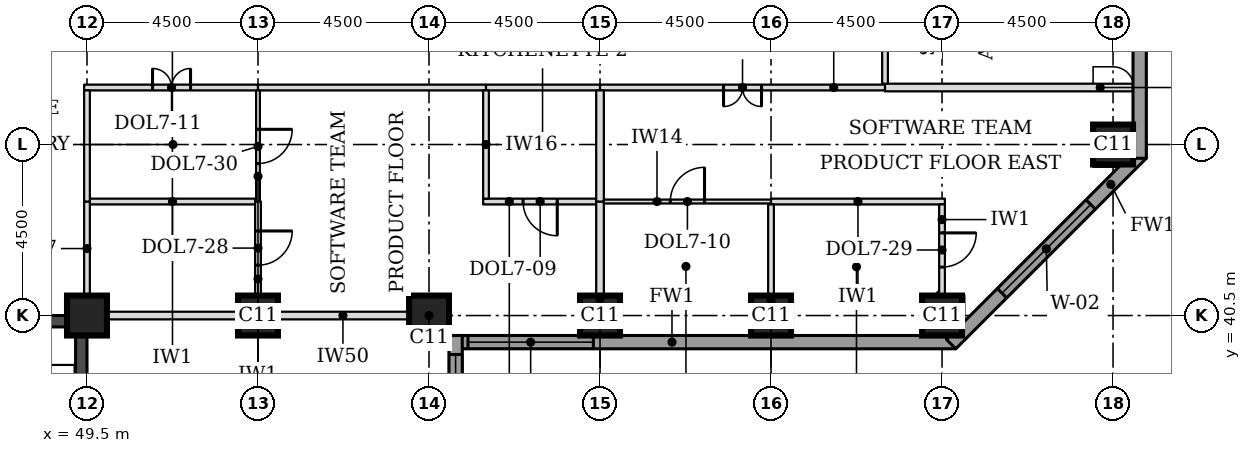
"""IFC4 building model, lengths in metres.
Left out: names, types, materials, properties, quantities, classifications, styles, units other than length and angle.
Written with IfcOpenShell. Run it as: python <this file> out.ifc"""

import sys

from ifc_helpers import new_model, si_unit, direction, frame, frame_2d, origin, origin_2d, place, context, subcontext, project, spatial, rectangle, extrude, element, fill, save


model = new_model("IFC4")
c1 = context("Model", 3, precision=1e-05, world=origin(), true_north=direction((0.0, 1.0)))
c2 = subcontext(c1, "Body", "Model", "MODEL_VIEW")
j1 = project(units=[si_unit("LENGTHUNIT", "METRE"), si_unit("PLANEANGLEUNIT", "RADIAN")], contexts=[c1])
p1 = place(None, origin())
s1 = spatial("IfcSite", under=j1, at=p1, CompositionType="ELEMENT")
p2 = place(p1, origin())
s2 = spatial("IfcBuilding", under=s1, at=p2, CompositionType="ELEMENT")
p3 = place(p2, frame((0.0, 0.0, 134.4)))
s3 = spatial("IfcBuildingStorey", under=s2, at=p3, CompositionType="ELEMENT", Elevation=134.4)
for number, where, z_axis, x_axis in (
    (1, (49.5, 40.5, 0.0), (0.0, 0.0, 1.0), (1.0, 0.0, 0.0)),
    (2, (54.0, 40.5, 0.0), (0.0, 0.0, 1.0), (1.0, 0.0, 0.0)),
    (3, (58.5, 40.5, 0.0), (0.0, 0.0, 1.0), (1.0, 0.0, 0.0)),
    (4, (63.0, 40.5, 0.0), (0.0, 0.0, 1.0), (1.0, 0.0, 0.0)),
    (5, (67.5, 40.5, 0.0), (0.0, 0.0, 1.0), (1.0, 0.0, 0.0)),
    (6, (72.0, 40.5, 0.0), (0.0, 0.0, 1.0), (1.0, 0.0, 0.0)),
    (7, (76.5, 45.0, 0.0), (0.0, 0.0, 1.0), (1.0, 0.0, 0.0)),
):
    element("IfcColumn", number, at=place(p3, frame(where, z_axis=z_axis, x_axis=x_axis)), inside=s3, PredefinedType="COLUMN", context=c2, shape_type="SweptSolid", body=[
        extrude(rectangle(XDim=1.05, YDim=1.05, at=origin_2d()), origin(), (0.0, 0.0, 1.0), 3.7),
    ])
p4 = place(p3, frame((40.8, 40.35, 0.0), z_axis=(0.0, 0.0, 1.0), x_axis=(1.0, 0.0, 0.0)))
e8 = element("IfcWall", 8, at=p4, inside=s3, PredefinedType="SHEAR", context=c2, shape_type="SweptSolid", body=[
    extrude(rectangle(XDim=8.4, YDim=0.3, at=frame_2d((4.2, 0.0))), origin(), (0.0, 0.0, 1.0), 3.7),
])
p5 = place(p4, frame((6.4, 0.0, 0.0)))
e9 = element("IfcOpeningElement", 9, at=p5, cuts=e8, PredefinedType="OPENING", context=c2, shape_type="SweptSolid", body=[
    extrude(rectangle(XDim=1.1, YDim=2.1, at=frame_2d((0.55, 1.05))), frame((0.0, 0.16, 0.0), z_axis=(0.0, -1.0, 0.0), x_axis=(1.0, 0.0, 0.0)), (0.0, 0.0, 1.0), 0.32),
])
p6 = place(p3, frame((49.35, 31.5, 0.0), z_axis=(0.0, 0.0, 1.0), x_axis=(0.0, 1.0, 0.0)))
e10 = element("IfcWall", 10, at=p6, inside=s3, PredefinedType="SHEAR", context=c2, shape_type="SweptSolid", body=[
    extrude(rectangle(XDim=9.0, YDim=0.3, at=frame_2d((4.5, 0.0))), origin(), (0.0, 0.0, 1.0), 3.7),
])
p7 = place(p3, frame((59.025, 39.8, 0.0), z_axis=(0.0, 0.0, 1.0), x_axis=(1.0, 0.0, 0.0)))
e11 = element("IfcWall", 11, at=p7, inside=s3, PredefinedType="STANDARD", context=c2, shape_type="SweptSolid", body=[
    extrude(rectangle(XDim=13.337, YDim=0.35, at=frame_2d((6.669, 0.0))), origin(), (0.0, 0.0, 1.0), 3.525),
])
p8 = place(p7, frame((0.5, 0.0, 0.9)))
e12 = element("IfcOpeningElement", 12, at=p8, cuts=e11, PredefinedType="OPENING", context=c2, shape_type="SweptSolid", body=[
    extrude(rectangle(XDim=3.3, YDim=1.9, at=frame_2d((1.65, 0.95))), frame((0.0, 0.185, 0.0), z_axis=(0.0, -1.0, 0.0), x_axis=(1.0, 0.0, 0.0)), (0.0, 0.0, 1.0), 0.37),
])
p9 = place(p3, frame((72.239, 39.749, 0.0), z_axis=(0.0, 0.0, 1.0), x_axis=(0.707106781187, 0.707106781187, 0.0)))
e13 = element("IfcWall", 13, at=p9, inside=s3, PredefinedType="STANDARD", context=c2, shape_type="SweptSolid", body=[
    extrude(rectangle(XDim=7.089, YDim=0.35, at=frame_2d((3.544, 0.0))), origin(), (0.0, 0.0, 1.0), 3.525),
])
p10 = place(p9, frame((1.894, 0.0, 0.9)))
e14 = element("IfcOpeningElement", 14, at=p10, cuts=e13, PredefinedType="OPENING", context=c2, shape_type="SweptSolid", body=[
    extrude(rectangle(XDim=3.3, YDim=1.9, at=frame_2d((1.65, 0.95))), frame((0.0, 0.185, 0.0), z_axis=(0.0, -1.0, 0.0), x_axis=(1.0, 0.0, 0.0)), (0.0, 0.0, 1.0), 0.37),
])
p11 = place(p3, frame((77.2, 44.638, 0.0), z_axis=(0.0, 0.0, 1.0), x_axis=(0.0, 1.0, 0.0)))
e15 = element("IfcWall", 15, at=p11, inside=s3, PredefinedType="STANDARD", context=c2, shape_type="SweptSolid", body=[
    extrude(rectangle(XDim=32.225, YDim=0.35, at=frame_2d((16.112, 0.0))), origin(), (0.0, 0.0, 1.0), 3.525),
])
p12 = place(p11, frame((5.462, 0.0, 0.9)))
e16 = element("IfcOpeningElement", 16, at=p12, cuts=e15, PredefinedType="OPENING", context=c2, shape_type="SweptSolid", body=[
    extrude(rectangle(XDim=3.3, YDim=1.9, at=frame_2d((1.65, 0.95))), frame((0.0, 0.185, 0.0), z_axis=(0.0, -1.0, 0.0), x_axis=(1.0, 0.0, 0.0)), (0.0, 0.0, 1.0), 0.37),
])
p13 = place(p11, frame((9.962, 0.0, 0.9)))
e17 = element("IfcOpeningElement", 17, at=p13, cuts=e15, PredefinedType="OPENING", context=c2, shape_type="SweptSolid", body=[
    extrude(rectangle(XDim=3.3, YDim=1.9, at=frame_2d((1.65, 0.95))), frame((0.0, 0.185, 0.0), z_axis=(0.0, -1.0, 0.0), x_axis=(1.0, 0.0, 0.0)), (0.0, 0.0, 1.0), 0.37),
])
p14 = place(p11, frame((14.462, 0.0, 0.9)))
e18 = element("IfcOpeningElement", 18, at=p14, cuts=e15, PredefinedType="OPENING", context=c2, shape_type="SweptSolid", body=[
    extrude(rectangle(XDim=3.3, YDim=1.9, at=frame_2d((1.65, 0.95))), frame((0.0, 0.185, 0.0), z_axis=(0.0, -1.0, 0.0), x_axis=(1.0, 0.0, 0.0)), (0.0, 0.0, 1.0), 0.37),
])
p15 = place(p11, frame((18.962, 0.0, 0.9)))
e19 = element("IfcOpeningElement", 19, at=p15, cuts=e15, PredefinedType="OPENING", context=c2, shape_type="SweptSolid", body=[
    extrude(rectangle(XDim=3.3, YDim=1.9, at=frame_2d((1.65, 0.95))), frame((0.0, 0.185, 0.0), z_axis=(0.0, -1.0, 0.0), x_axis=(1.0, 0.0, 0.0)), (0.0, 0.0, 1.0), 0.37),
])
p16 = place(p11, frame((23.462, 0.0, 0.9)))
e20 = element("IfcOpeningElement", 20, at=p16, cuts=e15, PredefinedType="OPENING", context=c2, shape_type="SweptSolid", body=[
    extrude(rectangle(XDim=3.3, YDim=1.9, at=frame_2d((1.65, 0.95))), frame((0.0, 0.185, 0.0), z_axis=(0.0, -1.0, 0.0), x_axis=(1.0, 0.0, 0.0)), (0.0, 0.0, 1.0), 0.37),
])
p17 = place(p3, frame((59.2, 22.138, 0.0), z_axis=(0.0, 0.0, 1.0), x_axis=(0.0, 1.0, 0.0)))
e21 = element("IfcWall", 21, at=p17, inside=s3, PredefinedType="STANDARD", context=c2, shape_type="SweptSolid", body=[
    extrude(rectangle(XDim=17.837, YDim=0.35, at=frame_2d((8.919, 0.0))), origin(), (0.0, 0.0, 1.0), 3.525),
])
p18 = place(p17, frame((5.462, 0.0, 0.9)))
e22 = element("IfcOpeningElement", 22, at=p18, cuts=e21, PredefinedType="OPENING", context=c2, shape_type="SweptSolid", body=[
    extrude(rectangle(XDim=3.3, YDim=1.9, at=frame_2d((1.65, 0.95))), frame((0.0, 0.185, 0.0), z_axis=(0.0, -1.0, 0.0), x_axis=(1.0, 0.0, 0.0)), (0.0, 0.0, 1.0), 0.37),
])
p19 = place(p17, frame((14.037, 0.0, 0.9)))
e23 = element("IfcOpeningElement", 23, at=p19, cuts=e21, PredefinedType="OPENING", context=c2, shape_type="SweptSolid", body=[
    extrude(rectangle(XDim=3.3, YDim=1.9, at=frame_2d((1.65, 0.95))), frame((0.0, 0.185, 0.0), z_axis=(0.0, -1.0, 0.0), x_axis=(1.0, 0.0, 0.0)), (0.0, 0.0, 1.0), 0.37),
])
p20 = place(p3, frame((50.015, 40.5, 0.0), z_axis=(0.0, 0.0, 1.0), x_axis=(1.0, 0.0, 0.0)))
e24 = element("IfcWall", 24, at=p20, inside=s3, PredefinedType="PARTITIONING", context=c2, shape_type="SweptSolid", body=[
    extrude(rectangle(XDim=3.46, YDim=0.2, at=frame_2d((1.73, 0.0))), origin(), (0.0, 0.0, 1.0), 2.8),
])
p21 = place(p3, frame((54.495, 40.5, 0.0), z_axis=(0.0, 0.0, 1.0), x_axis=(1.0, 0.0, 0.0)))
e25 = element("IfcWall", 25, at=p21, inside=s3, PredefinedType="PARTITIONING", context=c2, shape_type="SweptSolid", body=[
    extrude(rectangle(XDim=3.48, YDim=0.2, at=frame_2d((1.74, 0.0))), origin(), (0.0, 0.0, 1.0), 2.8),
])
p22 = place(p3, frame((49.575, 43.5, 0.0), z_axis=(0.0, 0.0, 1.0), x_axis=(1.0, 0.0, 0.0)))
e26 = element("IfcWall", 26, at=p22, inside=s3, PredefinedType="PARTITIONING", context=c2, shape_type="SweptSolid", body=[
    extrude(rectangle(XDim=4.35, YDim=0.15, at=frame_2d((2.175, 0.0))), origin(), (0.0, 0.0, 1.0), 3.55),
])
p23 = place(p3, frame((59.925, 43.5, 0.0), z_axis=(0.0, 0.0, 1.0), x_axis=(1.0, 0.0, 0.0)))
e27 = element("IfcWall", 27, at=p23, inside=s3, PredefinedType="PARTITIONING", context=c2, shape_type="SweptSolid", body=[
    extrude(rectangle(XDim=2.975, YDim=0.15, at=frame_2d((1.487, 0.0))), origin(), (0.0, 0.0, 1.0), 3.55),
])
p24 = place(p23, frame((1.05, 0.0, 0.0)))
e28 = element("IfcOpeningElement", 28, at=p24, cuts=e27, PredefinedType="OPENING", context=c2, shape_type="SweptSolid", body=[
    extrude(rectangle(XDim=0.9, YDim=2.1, at=frame_2d((0.45, 1.05))), frame((0.0, 0.085, 0.0), z_axis=(0.0, -1.0, 0.0), x_axis=(1.0, 0.0, 0.0)), (0.0, 0.0, 1.0), 0.17),
])
p25 = place(p3, frame((63.1, 43.5, 0.0), z_axis=(0.0, 0.0, 1.0), x_axis=(1.0, 0.0, 0.0)))
e29 = element("IfcWall", 29, at=p25, inside=s3, PredefinedType="PARTITIONING", context=c2, shape_type="SweptSolid", body=[
    extrude(rectangle(XDim=4.4, YDim=0.1, at=frame_2d((2.2, 0.0))), origin(), (0.0, 0.0, 1.0), 3.55),
])
p26 = place(p25, frame((1.75, 0.0, 0.0)))
e30 = element("IfcOpeningElement", 30, at=p26, cuts=e29, PredefinedType="OPENING", context=c2, shape_type="SweptSolid", body=[
    extrude(rectangle(XDim=0.9, YDim=2.1, at=frame_2d((0.45, 1.05))), frame((0.0, 0.06, 0.0), z_axis=(0.0, -1.0, 0.0), x_axis=(1.0, 0.0, 0.0)), (0.0, 0.0, 1.0), 0.12),
])
p27 = place(p3, frame((67.5, 43.5, 0.0), z_axis=(0.0, 0.0, 1.0), x_axis=(1.0, 0.0, 0.0)))
e31 = element("IfcWall", 31, at=p27, inside=s3, PredefinedType="PARTITIONING", context=c2, shape_type="SweptSolid", body=[
    extrude(rectangle(XDim=4.575, YDim=0.15, at=frame_2d((2.288, 0.0))), origin(), (0.0, 0.0, 1.0), 3.55),
])
p28 = place(p3, frame((49.425, 46.5, 0.0), z_axis=(0.0, 0.0, 1.0), x_axis=(1.0, 0.0, 0.0)))
e32 = element("IfcWall", 32, at=p28, inside=s3, PredefinedType="PARTITIONING", context=c2, shape_type="SweptSolid", body=[
    extrude(rectangle(XDim=4.575, YDim=0.15, at=frame_2d((2.288, 0.0))), origin(), (0.0, 0.0, 1.0), 3.55),
])
p29 = place(p28, frame((1.8, 0.0, 0.0)))
e33 = element("IfcOpeningElement", 33, at=p29, cuts=e32, PredefinedType="OPENING", context=c2, shape_type="SweptSolid", body=[
    extrude(rectangle(XDim=1.0, YDim=2.1, at=frame_2d((0.5, 1.05))), frame((0.0, 0.085, 0.0), z_axis=(0.0, -1.0, 0.0), x_axis=(1.0, 0.0, 0.0)), (0.0, 0.0, 1.0), 0.17),
])
p30 = place(p3, frame((54.0, 46.5, 0.0), z_axis=(0.0, 0.0, 1.0), x_axis=(1.0, 0.0, 0.0)))
e34 = element("IfcWall", 34, at=p30, inside=s3, PredefinedType="PARTITIONING", context=c2, shape_type="SweptSolid", body=[
    extrude(rectangle(XDim=6.0, YDim=0.15, at=frame_2d((3.0, 0.0))), origin(), (0.0, 0.0, 1.0), 3.55),
])
p31 = place(p3, frame((60.0, 46.5, 0.0), z_axis=(0.0, 0.0, 1.0), x_axis=(1.0, 0.0, 0.0)))
e35 = element("IfcWall", 35, at=p31, inside=s3, PredefinedType="PARTITIONING", context=c2, shape_type="SweptSolid", body=[
    extrude(rectangle(XDim=3.0, YDim=0.15, at=frame_2d((1.5, 0.0))), origin(), (0.0, 0.0, 1.0), 3.55),
])
p32 = place(p3, frame((63.0, 46.5, 0.0), z_axis=(0.0, 0.0, 1.0), x_axis=(1.0, 0.0, 0.0)))
e36 = element("IfcWall", 36, at=p32, inside=s3, PredefinedType="PARTITIONING", context=c2, shape_type="SweptSolid", body=[
    extrude(rectangle(XDim=7.5, YDim=0.15, at=frame_2d((3.75, 0.0))), origin(), (0.0, 0.0, 1.0), 3.55),
])
p33 = place(p32, frame((3.25, 0.0, 0.0)))
e37 = element("IfcOpeningElement", 37, at=p33, cuts=e36, PredefinedType="OPENING", context=c2, shape_type="SweptSolid", body=[
    extrude(rectangle(XDim=1.0, YDim=2.1, at=frame_2d((0.5, 1.05))), frame((0.0, 0.085, 0.0), z_axis=(0.0, -1.0, 0.0), x_axis=(1.0, 0.0, 0.0)), (0.0, 0.0, 1.0), 0.17),
])
p34 = place(p3, frame((70.5, 46.5, 0.0), z_axis=(0.0, 0.0, 1.0), x_axis=(1.0, 0.0, 0.0)))
e38 = element("IfcWall", 38, at=p34, inside=s3, PredefinedType="PARTITIONING", context=c2, shape_type="SweptSolid", body=[
    extrude(rectangle(XDim=6.525, YDim=0.2, at=frame_2d((3.262, 0.0))), origin(), (0.0, 0.0, 1.0), 3.55),
])
p35 = place(p3, frame((63.0, 39.975, 0.0), z_axis=(0.0, 0.0, 1.0), x_axis=(0.0, 1.0, 0.0)))
e39 = element("IfcWall", 39, at=p35, inside=s3, PredefinedType="PARTITIONING", context=c2, shape_type="SweptSolid", body=[
    extrude(rectangle(XDim=3.525, YDim=0.2, at=frame_2d((1.762, 0.0))), origin(), (0.0, 0.0, 1.0), 3.55),
])
p36 = place(p3, frame((67.5, 39.975, 0.0), z_axis=(0.0, 0.0, 1.0), x_axis=(0.0, 1.0, 0.0)))
e40 = element("IfcWall", 40, at=p36, inside=s3, PredefinedType="PARTITIONING", context=c2, shape_type="SweptSolid", body=[
    extrude(rectangle(XDim=3.45, YDim=0.15, at=frame_2d((1.725, 0.0))), origin(), (0.0, 0.0, 1.0), 2.938),
])
p37 = place(p3, frame((49.5, 41.025, 0.0), z_axis=(0.0, 0.0, 1.0), x_axis=(0.0, 1.0, 0.0)))
e41 = element("IfcWall", 41, at=p37, inside=s3, PredefinedType="PARTITIONING", context=c2, shape_type="SweptSolid", body=[
    extrude(rectangle(XDim=2.475, YDim=0.15, at=frame_2d((1.238, 0.0))), origin(), (0.0, 0.0, 1.0), 3.55),
])
p38 = place(p3, frame((54.0, 41.025, 0.0), z_axis=(0.0, 0.0, 1.0), x_axis=(0.0, 1.0, 0.0)))
e42 = element("IfcWall", 42, at=p38, inside=s3, PredefinedType="PARTITIONING", context=c2, shape_type="SweptSolid", body=[
    extrude(rectangle(XDim=2.475, YDim=0.15, at=frame_2d((1.238, 0.0))), origin(), (0.0, 0.0, 1.0), 3.55),
])
p39 = place(p38, frame((0.8, 0.0, 0.0)))
e43 = element("IfcOpeningElement", 43, at=p39, cuts=e42, PredefinedType="OPENING", context=c2, shape_type="SweptSolid", body=[
    extrude(rectangle(XDim=0.9, YDim=2.1, at=frame_2d((0.45, 1.05))), frame((0.0, 0.085, 0.0), z_axis=(0.0, -1.0, 0.0), x_axis=(1.0, 0.0, 0.0)), (0.0, 0.0, 1.0), 0.17),
])
p40 = place(p3, frame((72.0, 41.025, 0.0), z_axis=(0.0, 0.0, 1.0), x_axis=(0.0, 1.0, 0.0)))
e44 = element("IfcWall", 44, at=p40, inside=s3, PredefinedType="PARTITIONING", context=c2, shape_type="SweptSolid", body=[
    extrude(rectangle(XDim=2.4, YDim=0.15, at=frame_2d((1.2, 0.0))), origin(), (0.0, 0.0, 1.0), 3.55),
])
p41 = place(p40, frame((0.75, 0.0, 0.0)))
e45 = element("IfcOpeningElement", 45, at=p41, cuts=e44, PredefinedType="OPENING", context=c2, shape_type="SweptSolid", body=[
    extrude(rectangle(XDim=0.9, YDim=2.1, at=frame_2d((0.45, 1.05))), frame((0.0, 0.085, 0.0), z_axis=(0.0, -1.0, 0.0), x_axis=(1.0, 0.0, 0.0)), (0.0, 0.0, 1.0), 0.17),
])
p42 = place(p3, frame((49.5, 43.5, 0.0), z_axis=(0.0, 0.0, 1.0), x_axis=(0.0, 1.0, 0.0)))
e46 = element("IfcWall", 46, at=p42, inside=s3, PredefinedType="PARTITIONING", context=c2, shape_type="SweptSolid", body=[
    extrude(rectangle(XDim=2.925, YDim=0.15, at=frame_2d((1.462, 0.0))), origin(), (0.0, 0.0, 1.0), 3.55),
])
p43 = place(p3, frame((54.0, 43.5, 0.0), z_axis=(0.0, 0.0, 1.0), x_axis=(0.0, 1.0, 0.0)))
e47 = element("IfcWall", 47, at=p43, inside=s3, PredefinedType="PARTITIONING", context=c2, shape_type="SweptSolid", body=[
    extrude(rectangle(XDim=2.925, YDim=0.1, at=frame_2d((1.462, 0.0))), origin(), (0.0, 0.0, 1.0), 3.55),
])
p44 = place(p43, frame((1.0, 0.0, 0.0)))
e48 = element("IfcOpeningElement", 48, at=p44, cuts=e47, PredefinedType="OPENING", context=c2, shape_type="SweptSolid", body=[
    extrude(rectangle(XDim=0.9, YDim=2.1, at=frame_2d((0.45, 1.05))), frame((0.0, 0.06, 0.0), z_axis=(0.0, -1.0, 0.0), x_axis=(1.0, 0.0, 0.0)), (0.0, 0.0, 1.0), 0.12),
])
p45 = place(p3, frame((63.0, 43.5, 0.0), z_axis=(0.0, 0.0, 1.0), x_axis=(0.0, 1.0, 0.0)))
e49 = element("IfcWall", 49, at=p45, inside=s3, PredefinedType="PARTITIONING", context=c2, shape_type="SweptSolid", body=[
    extrude(rectangle(XDim=2.925, YDim=0.2, at=frame_2d((1.462, 0.0))), origin(), (0.0, 0.0, 1.0), 3.55),
])
p46 = place(p3, frame((60.0, 43.575, 0.0), z_axis=(0.0, 0.0, 1.0), x_axis=(0.0, 1.0, 0.0)))
e50 = element("IfcWall", 50, at=p46, inside=s3, PredefinedType="PARTITIONING", context=c2, shape_type="SweptSolid", body=[
    extrude(rectangle(XDim=2.85, YDim=0.15, at=frame_2d((1.425, 0.0))), origin(), (0.0, 0.0, 1.0), 3.55),
])
p47 = place(p3, frame((70.5, 46.6, 0.0), z_axis=(0.0, 0.0, 1.0), x_axis=(0.0, 1.0, 0.0)))
e51 = element("IfcWall", 51, at=p47, inside=s3, PredefinedType="PARTITIONING", context=c2, shape_type="SweptSolid", body=[
    extrude(rectangle(XDim=13.4, YDim=0.15, at=frame_2d((6.7, 0.0))), origin(), (0.0, 0.0, 1.0), 3.55),
])
p48 = place(p47, frame((6.2, 0.0, 0.0)))
e52 = element("IfcOpeningElement", 52, at=p48, cuts=e51, PredefinedType="OPENING", context=c2, shape_type="SweptSolid", body=[
    extrude(rectangle(XDim=1.0, YDim=2.1, at=frame_2d((0.5, 1.05))), frame((0.0, 0.085, 0.0), z_axis=(0.0, -1.0, 0.0), x_axis=(1.0, 0.0, 0.0)), (0.0, 0.0, 1.0), 0.17),
])
p49 = place(p8, origin())
e53 = element("IfcWindow", 53, at=p49, inside=s3, PartitioningType="SINGLE_PANEL", PredefinedType="WINDOW", context=c2, shape_type="SweptSolid", body=[
    extrude(rectangle(XDim=3.3, YDim=1.9, at=frame_2d((1.65, 0.95))), frame((0.0, 0.085, 0.0), z_axis=(0.0, -1.0, 0.0), x_axis=(1.0, 0.0, 0.0)), (0.0, 0.0, 1.0), 0.06),
])
fill(e12, e53)
p50 = place(p10, origin())
e54 = element("IfcWindow", 54, at=p50, inside=s3, PartitioningType="SINGLE_PANEL", PredefinedType="WINDOW", context=c2, shape_type="SweptSolid", body=[
    extrude(rectangle(XDim=3.3, YDim=1.9, at=frame_2d((1.65, 0.95))), frame((0.0, 0.085, 0.0), z_axis=(0.0, -1.0, 0.0), x_axis=(1.0, 0.0, 0.0)), (0.0, 0.0, 1.0), 0.06),
])
fill(e14, e54)
p51 = place(p19, origin())
e55 = element("IfcWindow", 55, at=p51, inside=s3, PartitioningType="SINGLE_PANEL", PredefinedType="WINDOW", context=c2, shape_type="SweptSolid", body=[
    extrude(rectangle(XDim=3.3, YDim=1.9, at=frame_2d((1.65, 0.95))), frame((0.0, 0.085, 0.0), z_axis=(0.0, -1.0, 0.0), x_axis=(1.0, 0.0, 0.0)), (0.0, 0.0, 1.0), 0.06),
])
fill(e23, e55)
p52 = place(p29, origin())
e56 = element("IfcDoor", 56, at=p52, inside=s3, OperationType="DOUBLE_DOOR_SINGLE_SWING", PredefinedType="DOOR", context=c2, shape_type="SweptSolid", body=[
    extrude(rectangle(XDim=1.0, YDim=2.1, at=frame_2d((0.5, 1.05))), frame((0.0, 0.025, 0.0), z_axis=(0.0, -1.0, 0.0), x_axis=(1.0, 0.0, 0.0)), (0.0, 0.0, 1.0), 0.05),
])
fill(e33, e56)
p53 = place(p44, frame((0.9, 0.0, 0.0), z_axis=(0.0, 0.0, 1.0), x_axis=(-1.0, 0.0, 0.0)))
e57 = element("IfcDoor", 57, at=p53, inside=s3, OperationType="SINGLE_SWING_LEFT", PredefinedType="DOOR", context=c2, shape_type="SweptSolid", body=[
    extrude(rectangle(XDim=0.9, YDim=2.1, at=frame_2d((0.45, 1.05))), frame((0.0, 0.025, 0.0), z_axis=(0.0, -1.0, 0.0), x_axis=(1.0, 0.0, 0.0)), (0.0, 0.0, 1.0), 0.05),
])
fill(e48, e57)
p54 = place(p24, frame((0.9, 0.0, 0.0), z_axis=(0.0, 0.0, 1.0), x_axis=(-1.0, 0.0, 0.0)))
e58 = element("IfcDoor", 58, at=p54, inside=s3, OperationType="SINGLE_SWING_LEFT", PredefinedType="DOOR", context=c2, shape_type="SweptSolid", body=[
    extrude(rectangle(XDim=0.9, YDim=2.1, at=frame_2d((0.45, 1.05))), frame((0.0, 0.025, 0.0), z_axis=(0.0, -1.0, 0.0), x_axis=(1.0, 0.0, 0.0)), (0.0, 0.0, 1.0), 0.05),
])
fill(e28, e58)
p55 = place(p39, frame((0.9, 0.0, 0.0), z_axis=(0.0, 0.0, 1.0), x_axis=(-1.0, 0.0, 0.0)))
e59 = element("IfcDoor", 59, at=p55, inside=s3, OperationType="SINGLE_SWING_LEFT", PredefinedType="DOOR", context=c2, shape_type="SweptSolid", body=[
    extrude(rectangle(XDim=0.9, YDim=2.1, at=frame_2d((0.45, 1.05))), frame((0.0, 0.025, 0.0), z_axis=(0.0, -1.0, 0.0), x_axis=(1.0, 0.0, 0.0)), (0.0, 0.0, 1.0), 0.05),
])
fill(e43, e59)
p56 = place(p33, frame((1.0, 0.0, 0.0), z_axis=(0.0, 0.0, 1.0), x_axis=(-1.0, 0.0, 0.0)))
e60 = element("IfcDoor", 60, at=p56, inside=s3, OperationType="DOUBLE_DOOR_SINGLE_SWING", PredefinedType="DOOR", context=c2, shape_type="SweptSolid", body=[
    extrude(rectangle(XDim=1.0, YDim=2.1, at=frame_2d((0.5, 1.05))), frame((0.0, 0.025, 0.0), z_axis=(0.0, -1.0, 0.0), x_axis=(1.0, 0.0, 0.0)), (0.0, 0.0, 1.0), 0.05),
])
fill(e37, e60)
p57 = place(p26, origin())
e61 = element("IfcDoor", 61, at=p57, inside=s3, OperationType="SINGLE_SWING_RIGHT", PredefinedType="DOOR", context=c2, shape_type="SweptSolid", body=[
    extrude(rectangle(XDim=0.9, YDim=2.1, at=frame_2d((0.45, 1.05))), frame((0.0, 0.025, 0.0), z_axis=(0.0, -1.0, 0.0), x_axis=(1.0, 0.0, 0.0)), (0.0, 0.0, 1.0), 0.05),
])
fill(e30, e61)
p58 = place(p41, frame((0.9, 0.0, 0.0), z_axis=(0.0, 0.0, 1.0), x_axis=(-1.0, 0.0, 0.0)))
e62 = element("IfcDoor", 62, at=p58, inside=s3, OperationType="SINGLE_SWING_LEFT", PredefinedType="DOOR", context=c2, shape_type="SweptSolid", body=[
    extrude(rectangle(XDim=0.9, YDim=2.1, at=frame_2d((0.45, 1.05))), frame((0.0, 0.025, 0.0), z_axis=(0.0, -1.0, 0.0), x_axis=(1.0, 0.0, 0.0)), (0.0, 0.0, 1.0), 0.05),
])
fill(e45, e62)
save(model, sys.argv[1])
